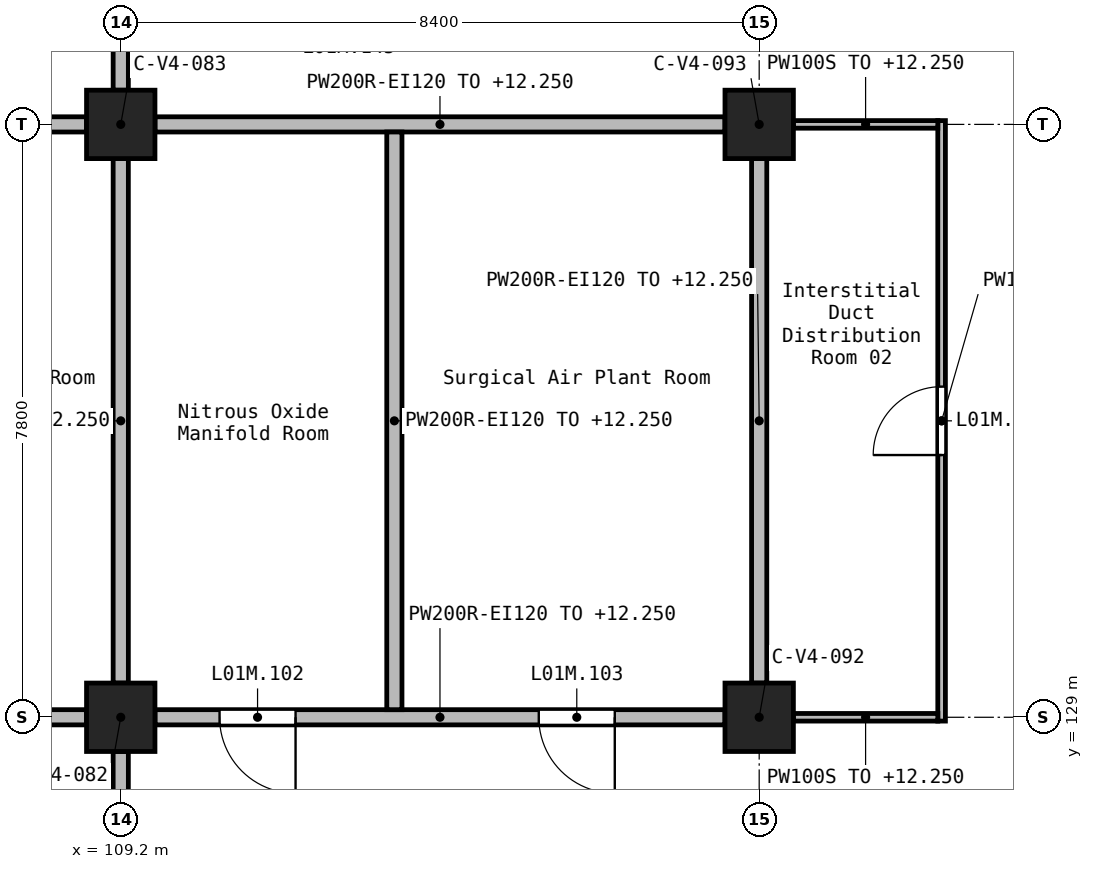
"""IFC4 building model, lengths in metres.
Left out: names, types, materials, properties, quantities, classifications, styles, units other than length and angle.
Written with IfcOpenShell. Run it as: python <this file> out.ifc"""

import sys

from ifc_helpers import new_model, si_unit, direction, frame, frame_2d, origin, origin_2d, place, context, subcontext, project, spatial, rectangle, extrude, element, fill, save


model = new_model("IFC4")
c1 = context("Model", 3, precision=1e-05, world=origin(), true_north=direction((0.0, 1.0)))
c2 = subcontext(c1, "Body", "Model", "MODEL_VIEW")
j1 = project(units=[si_unit("LENGTHUNIT", "METRE"), si_unit("PLANEANGLEUNIT", "RADIAN")], contexts=[c1])
p1 = place(None, origin())
s1 = spatial("IfcSite", under=j1, at=p1, CompositionType="ELEMENT")
p2 = place(p1, origin())
s2 = spatial("IfcBuilding", under=s1, at=p2, CompositionType="ELEMENT")
p3 = place(p2, frame((0.0, 0.0, 9.9)))
s3 = spatial("IfcBuildingStorey", under=s2, at=p3, CompositionType="ELEMENT", Elevation=9.9)
for number, where, z_axis, x_axis in (
    (1, (109.2, 129.0, 0.0), (0.0, 0.0, 1.0), (1.0, 0.0, 0.0)),
    (2, (109.2, 136.8, 0.0), (0.0, 0.0, 1.0), (1.0, 0.0, 0.0)),
    (3, (117.6, 129.0, 0.0), (0.0, 0.0, 1.0), (1.0, 0.0, 0.0)),
    (4, (117.6, 136.8, 0.0), (0.0, 0.0, 1.0), (1.0, 0.0, 0.0)),
):
    element("IfcColumn", number, at=place(p3, frame(where, z_axis=z_axis, x_axis=x_axis)), inside=s3, PredefinedType="COLUMN", context=c2, shape_type="SweptSolid", body=[
        extrude(rectangle(XDim=0.9, YDim=0.9, at=origin_2d()), origin(), (0.0, 0.0, 1.0), 2.7),
    ])
p4 = place(p3, frame((109.2, 139.95, 0.0), z_axis=(0.0, 0.0, 1.0), x_axis=(0.0, -1.0, 0.0)))
e5 = element("IfcWall", 5, at=p4, inside=s3, PredefinedType="SOLIDWALL", context=c2, shape_type="SweptSolid", body=[
    extrude(rectangle(XDim=2.7, YDim=0.2, at=frame_2d((1.35, 0.0))), origin(), (0.0, 0.0, 1.0), 2.35),
])
p5 = place(p3, frame((109.2, 136.35, 0.0), z_axis=(0.0, 0.0, 1.0), x_axis=(0.0, -1.0, 0.0)))
e6 = element("IfcWall", 6, at=p5, inside=s3, PredefinedType="SOLIDWALL", context=c2, shape_type="SweptSolid", body=[
    extrude(rectangle(XDim=6.9, YDim=0.2, at=frame_2d((3.45, 0.0))), origin(), (0.0, 0.0, 1.0), 2.35),
])
p6 = place(p3, frame((109.2, 128.55, 0.0), z_axis=(0.0, 0.0, 1.0), x_axis=(0.0, -1.0, 0.0)))
e7 = element("IfcWall", 7, at=p6, inside=s3, PredefinedType="SOLIDWALL", context=c2, shape_type="SweptSolid", body=[
    extrude(rectangle(XDim=2.7, YDim=0.2, at=frame_2d((1.35, 0.0))), origin(), (0.0, 0.0, 1.0), 2.35),
])
p7 = place(p3, frame((117.15, 129.0, 0.0), z_axis=(0.0, 0.0, 1.0), x_axis=(-1.0, 0.0, 0.0)))
e8 = element("IfcWall", 8, at=p7, inside=s3, PredefinedType="SOLIDWALL", context=c2, shape_type="SweptSolid", body=[
    extrude(rectangle(XDim=7.5, YDim=0.2, at=frame_2d((3.75, 0.0))), origin(), (0.0, 0.0, 1.0), 2.35),
])
p8 = place(p7, frame((5.65, 0.0, 0.0)))
e9 = element("IfcOpeningElement", 9, at=p8, cuts=e8, PredefinedType="OPENING", context=c2, shape_type="SweptSolid", body=[
    extrude(rectangle(XDim=1.0, YDim=2.1, at=frame_2d((0.5, 1.05))), frame((0.0, 0.11, 0.0), z_axis=(0.0, -1.0, 0.0), x_axis=(1.0, 0.0, 0.0)), (0.0, 0.0, 1.0), 0.22),
])
p9 = place(p7, frame((1.45, 0.0, 0.0)))
e10 = element("IfcOpeningElement", 10, at=p9, cuts=e8, PredefinedType="OPENING", context=c2, shape_type="SweptSolid", body=[
    extrude(rectangle(XDim=1.0, YDim=2.1, at=frame_2d((0.5, 1.05))), frame((0.0, 0.11, 0.0), z_axis=(0.0, -1.0, 0.0), x_axis=(1.0, 0.0, 0.0)), (0.0, 0.0, 1.0), 0.22),
])
p10 = place(p3, frame((108.75, 129.0, 0.0), z_axis=(0.0, 0.0, 1.0), x_axis=(-1.0, 0.0, 0.0)))
e11 = element("IfcWall", 11, at=p10, inside=s3, PredefinedType="SOLIDWALL", context=c2, shape_type="SweptSolid", body=[
    extrude(rectangle(XDim=7.5, YDim=0.2, at=frame_2d((3.75, 0.0))), origin(), (0.0, 0.0, 1.0), 2.35),
])
p11 = place(p10, frame((1.45, 0.0, 0.0)))
e12 = element("IfcOpeningElement", 12, at=p11, cuts=e11, PredefinedType="OPENING", context=c2, shape_type="SweptSolid", body=[
    extrude(rectangle(XDim=1.0, YDim=2.1, at=frame_2d((0.5, 1.05))), frame((0.0, 0.11, 0.0), z_axis=(0.0, -1.0, 0.0), x_axis=(1.0, 0.0, 0.0)), (0.0, 0.0, 1.0), 0.22),
])
for number, where, z_axis, x_axis in (
    (13, (117.15, 136.8, 0.0), (0.0, 0.0, 1.0), (-1.0, 0.0, 0.0)),
    (14, (108.75, 136.8, 0.0), (0.0, 0.0, 1.0), (-1.0, 0.0, 0.0)),
):
    element("IfcWall", number, at=place(p3, frame(where, z_axis=z_axis, x_axis=x_axis)), inside=s3, PredefinedType="SOLIDWALL", context=c2, shape_type="SweptSolid", body=[
        extrude(rectangle(XDim=7.5, YDim=0.2, at=frame_2d((3.75, 0.0))), origin(), (0.0, 0.0, 1.0), 2.35),
    ])
p12 = place(p3, frame((112.8, 129.1, 0.0), z_axis=(0.0, 0.0, 1.0), x_axis=(0.0, 1.0, 0.0)))
e15 = element("IfcWall", 15, at=p12, inside=s3, PredefinedType="SOLIDWALL", context=c2, shape_type="SweptSolid", body=[
    extrude(rectangle(XDim=7.6, YDim=0.2, at=frame_2d((3.8, 0.0))), origin(), (0.0, 0.0, 1.0), 2.35),
])
p13 = place(p3, frame((117.6, 129.45, 0.0), z_axis=(0.0, 0.0, 1.0), x_axis=(0.0, 1.0, 0.0)))
e16 = element("IfcWall", 16, at=p13, inside=s3, PredefinedType="SOLIDWALL", context=c2, shape_type="SweptSolid", body=[
    extrude(rectangle(XDim=6.9, YDim=0.2, at=frame_2d((3.45, 0.0))), origin(), (0.0, 0.0, 1.0), 2.35),
])
p14 = place(p3, frame((120.0, 128.95, 0.0), z_axis=(0.0, 0.0, 1.0), x_axis=(0.0, 1.0, 0.0)))
e17 = element("IfcWall", 17, at=p14, inside=s3, PredefinedType="PARTITIONING", context=c2, shape_type="SweptSolid", body=[
    extrude(rectangle(XDim=7.9, YDim=0.1, at=frame_2d((3.95, 0.0))), origin(), (0.0, 0.0, 1.0), 2.35),
])
p15 = place(p14, frame((3.5, 0.0, 0.0)))
e18 = element("IfcOpeningElement", 18, at=p15, cuts=e17, PredefinedType="OPENING", context=c2, shape_type="SweptSolid", body=[
    extrude(rectangle(XDim=0.9, YDim=2.1, at=frame_2d((0.45, 1.05))), frame((0.0, 0.06, 0.0), z_axis=(0.0, -1.0, 0.0), x_axis=(1.0, 0.0, 0.0)), (0.0, 0.0, 1.0), 0.12),
])
for number, where, z_axis, x_axis in (
    (19, (118.05, 129.0, 0.0), (0.0, 0.0, 1.0), (1.0, 0.0, 0.0)),
    (20, (118.05, 136.8, 0.0), (0.0, 0.0, 1.0), (1.0, 0.0, 0.0)),
):
    element("IfcWall", number, at=place(p3, frame(where, z_axis=z_axis, x_axis=x_axis)), inside=s3, PredefinedType="PARTITIONING", context=c2, shape_type="SweptSolid", body=[
        extrude(rectangle(XDim=1.9, YDim=0.1, at=frame_2d((0.95, 0.0))), origin(), (0.0, 0.0, 1.0), 2.35),
    ])
p16 = place(p8, frame((1.0, 0.0, 0.0), z_axis=(0.0, 0.0, 1.0), x_axis=(-1.0, 0.0, 0.0)))
e21 = element("IfcDoor", 21, at=p16, inside=s3, OperationType="SINGLE_SWING_LEFT", PredefinedType="DOOR", context=c2, shape_type="SweptSolid", body=[
    extrude(rectangle(XDim=1.0, YDim=2.1, at=frame_2d((0.5, 1.05))), frame((0.0, 0.025, 0.0), z_axis=(0.0, -1.0, 0.0), x_axis=(1.0, 0.0, 0.0)), (0.0, 0.0, 1.0), 0.05),
])
fill(e9, e21)
p17 = place(p9, frame((1.0, 0.0, 0.0), z_axis=(0.0, 0.0, 1.0), x_axis=(-1.0, 0.0, 0.0)))
e22 = element("IfcDoor", 22, at=p17, inside=s3, OperationType="SINGLE_SWING_RIGHT", PredefinedType="DOOR", context=c2, shape_type="SweptSolid", body=[
    extrude(rectangle(XDim=1.0, YDim=2.1, at=frame_2d((0.5, 1.05))), frame((0.0, 0.025, 0.0), z_axis=(0.0, -1.0, 0.0), x_axis=(1.0, 0.0, 0.0)), (0.0, 0.0, 1.0), 0.05),
])
fill(e10, e22)
p18 = place(p15, origin())
e23 = element("IfcDoor", 23, at=p18, inside=s3, OperationType="SINGLE_SWING_LEFT", PredefinedType="DOOR", context=c2, shape_type="SweptSolid", body=[
    extrude(rectangle(XDim=0.9, YDim=2.1, at=frame_2d((0.45, 1.05))), frame((0.0, 0.025, 0.0), z_axis=(0.0, -1.0, 0.0), x_axis=(1.0, 0.0, 0.0)), (0.0, 0.0, 1.0), 0.05),
])
fill(e18, e23)
save(model, sys.argv[1])
